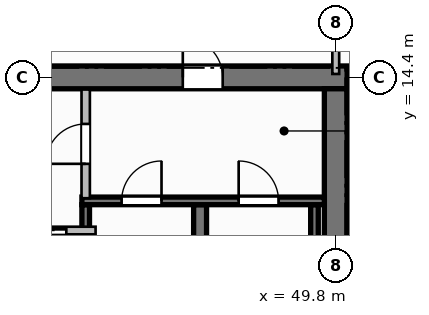
"""IFC4 building model, lengths in metres.
Left out: names, types, materials, properties, quantities, classifications, styles, units other than length and angle.
Written with IfcOpenShell. Run it as: python <this file> out.ifc"""

import sys

from ifc_helpers import new_model, si_unit, direction, frame, frame_2d, origin, place, context, subcontext, project, spatial, rectangle, extrude, source, transform, mapped, element, fill, save


model = new_model("IFC4")
c1 = context("Model", 3, precision=1e-05, world=origin(), true_north=direction((0.0, 1.0)))
c2 = subcontext(c1, "Body", "Model", "MODEL_VIEW")
j1 = project(units=[si_unit("LENGTHUNIT", "METRE"), si_unit("PLANEANGLEUNIT", "RADIAN")], contexts=[c1])
p1 = place(None, origin())
s1 = spatial("IfcSite", under=j1, at=p1, CompositionType="ELEMENT")
p2 = place(p1, origin())
s2 = spatial("IfcBuilding", under=s1, at=p2, CompositionType="ELEMENT")
p3 = place(p2, frame((0.0, 0.0, 21.6)))
s3 = spatial("IfcBuildingStorey", under=s2, at=p3, CompositionType="ELEMENT", Elevation=21.6)
p4 = place(p3, frame((34.5, 14.4, 0.0), z_axis=(0.0, 0.0, 1.0), x_axis=(1.0, 0.0, 0.0)))
e1 = element("IfcWall", 1, at=p4, inside=s3, PredefinedType="SHEAR", context=c2, shape_type="SweptSolid", body=[
    extrude(rectangle(XDim=15.6, YDim=0.6, at=frame_2d((7.8, 0.0))), origin(), (0.0, 0.0, 1.0), 5.4),
])
p5 = place(p4, frame((5.43, 0.0, 0.0)))
e2 = element("IfcOpeningElement", 2, at=p5, cuts=e1, PredefinedType="OPENING", context=c2, shape_type="SweptSolid", body=[
    extrude(rectangle(XDim=1.5, YDim=2.2, at=frame_2d((0.75, 1.1))), frame((0.0, 0.31, 0.0), z_axis=(0.0, -1.0, 0.0), x_axis=(1.0, 0.0, 0.0)), (0.0, 0.0, 1.0), 0.62),
])
p6 = place(p4, frame((1.645, 0.0, 0.0)))
e3 = element("IfcOpeningElement", 3, at=p6, cuts=e1, PredefinedType="OPENING", context=c2, shape_type="SweptSolid", body=[
    extrude(rectangle(XDim=1.05, YDim=2.15, at=frame_2d((0.525, 1.075))), frame((0.0, 0.31, 0.0), z_axis=(0.0, -1.0, 0.0), x_axis=(1.0, 0.0, 0.0)), (0.0, 0.0, 1.0), 0.62),
])
p7 = place(p4, frame((11.275, 0.0, 0.0)))
e4 = element("IfcOpeningElement", 4, at=p7, cuts=e1, PredefinedType="OPENING", context=c2, shape_type="SweptSolid", body=[
    extrude(rectangle(XDim=1.05, YDim=2.15, at=frame_2d((0.525, 1.075))), frame((0.0, 0.31, 0.0), z_axis=(0.0, -1.0, 0.0), x_axis=(1.0, 0.0, 0.0)), (0.0, 0.0, 1.0), 0.62),
])
p8 = place(p3, frame((49.8, 3.9, 0.0), z_axis=(0.0, 0.0, 1.0), x_axis=(0.0, 1.0, 0.0)))
e5 = element("IfcWall", 5, at=p8, inside=s3, PredefinedType="SHEAR", context=c2, shape_type="SweptSolid", body=[
    extrude(rectangle(XDim=10.2, YDim=0.6, at=frame_2d((5.1, 0.0))), origin(), (0.0, 0.0, 1.0), 5.4),
])
p9 = place(p3, frame((43.22, 4.1, 0.0), z_axis=(0.0, 0.0, 1.0), x_axis=(0.0, 1.0, 0.0)))
e6 = element("IfcWall", 6, at=p9, inside=s3, PredefinedType="SHEAR", context=c2, shape_type="SweptSolid", body=[
    extrude(rectangle(XDim=6.95, YDim=0.2, at=frame_2d((3.475, 0.0))), origin(), (0.0, 0.0, 1.0), 5.4),
])
p10 = place(p3, frame((46.23, 4.1, 0.0), z_axis=(0.0, 0.0, 1.0), x_axis=(0.0, 1.0, 0.0)))
e7 = element("IfcWall", 7, at=p10, inside=s3, PredefinedType="SHEAR", context=c2, shape_type="SweptSolid", body=[
    extrude(rectangle(XDim=6.95, YDim=0.34, at=frame_2d((3.475, 0.0))), origin(), (0.0, 0.0, 1.0), 5.4),
])
p11 = place(p3, frame((49.24, 4.1, 0.0), z_axis=(0.0, 0.0, 1.0), x_axis=(0.0, 1.0, 0.0)))
e8 = element("IfcWall", 8, at=p11, inside=s3, PredefinedType="SHEAR", context=c2, shape_type="SweptSolid", body=[
    extrude(rectangle(XDim=6.95, YDim=0.2, at=frame_2d((3.475, 0.0))), origin(), (0.0, 0.0, 1.0), 5.4),
])
p12 = place(p3, frame((43.12, 11.15, 0.0), z_axis=(0.0, 0.0, 1.0), x_axis=(1.0, 0.0, 0.0)))
e9 = element("IfcWall", 9, at=p12, inside=s3, PredefinedType="SHEAR", context=c2, shape_type="SweptSolid", body=[
    extrude(rectangle(XDim=6.38, YDim=0.2, at=frame_2d((3.19, 0.0))), origin(), (0.0, 0.0, 1.0), 5.4),
])
p13 = place(p12, frame((1.045, 0.0, 0.0)))
e10 = element("IfcOpeningElement", 10, at=p13, cuts=e9, PredefinedType="OPENING", context=c2, shape_type="SweptSolid", body=[
    extrude(rectangle(XDim=1.05, YDim=2.2, at=frame_2d((0.525, 1.1))), frame((0.0, 0.11, 0.0), z_axis=(0.0, -1.0, 0.0), x_axis=(1.0, 0.0, 0.0)), (0.0, 0.0, 1.0), 0.22),
])
p14 = place(p12, frame((4.125, 0.0, 0.0)))
e11 = element("IfcOpeningElement", 11, at=p14, cuts=e9, PredefinedType="OPENING", context=c2, shape_type="SweptSolid", body=[
    extrude(rectangle(XDim=1.05, YDim=2.2, at=frame_2d((0.525, 1.1))), frame((0.0, 0.11, 0.0), z_axis=(0.0, -1.0, 0.0), x_axis=(1.0, 0.0, 0.0)), (0.0, 0.0, 1.0), 0.22),
])
p15 = place(p3, frame((43.22, 11.22, 0.0), z_axis=(0.0, 0.0, 1.0), x_axis=(0.0, 1.0, 0.0)))
e12 = element("IfcWall", 12, at=p15, inside=s3, PredefinedType="PARTITIONING", context=c2, shape_type="SweptSolid", body=[
    extrude(rectangle(XDim=2.86, YDim=0.22, at=frame_2d((1.43, 0.0))), origin(), (0.0, 0.0, 1.0), 5.1),
])
p16 = place(p15, frame((0.905, 0.0, 0.0)))
e13 = element("IfcOpeningElement", 13, at=p16, cuts=e12, PredefinedType="OPENING", context=c2, shape_type="SweptSolid", body=[
    extrude(rectangle(XDim=1.05, YDim=2.15, at=frame_2d((0.525, 1.075))), frame((0.0, 0.12, 0.0), z_axis=(0.0, -1.0, 0.0), x_axis=(1.0, 0.0, 0.0)), (0.0, 0.0, 1.0), 0.24),
])
p17 = place(p3, frame((49.8, 14.49, 0.0), z_axis=(0.0, 0.0, 1.0), x_axis=(0.0, 1.0, 0.0)))
e14 = element("IfcWall", 14, at=p17, inside=s3, PredefinedType="PARTITIONING", context=c2, shape_type="SweptSolid", body=[
    extrude(rectangle(XDim=3.42, YDim=0.18, at=frame_2d((1.71, 0.0))), origin(), (0.0, 0.0, 1.0), 4.085),
])
p18 = place(p3, frame((40.84, 10.37, 0.0), z_axis=(0.0, 0.0, 1.0), x_axis=(1.0, 0.0, 0.0)))
e15 = element("IfcWall", 15, at=p18, inside=s3, PredefinedType="PARTITIONING", context=c2, shape_type="SweptSolid", body=[
    extrude(rectangle(XDim=2.64, YDim=0.2, at=frame_2d((1.32, 0.0))), origin(), (0.0, 0.0, 1.0), 5.1),
])
p19 = place(p18, frame((0.77, 0.0, 0.0)))
e16 = element("IfcOpeningElement", 16, at=p19, cuts=e15, PredefinedType="OPENING", context=c2, shape_type="SweptSolid", body=[
    extrude(rectangle(XDim=1.1, YDim=2.2, at=frame_2d((0.55, 1.1))), frame((0.0, 0.11, 0.0), z_axis=(0.0, -1.0, 0.0), x_axis=(1.0, 0.0, 0.0)), (0.0, 0.0, 1.0), 0.22),
])
m1 = source(origin(), c2, "Body", "SweptSolid", [
    extrude(rectangle(XDim=1.05, YDim=2.2, at=frame_2d((0.525, 1.1))), frame((0.0, 0.025, 0.0), z_axis=(0.0, -1.0, 0.0), x_axis=(1.0, 0.0, 0.0)), (0.0, 0.0, 1.0), 0.05),
])
p20 = place(p13, origin())
e17 = element("IfcDoor", 17, at=p20, inside=s3, OperationType="SINGLE_SWING_RIGHT", PredefinedType="DOOR", context=c2, shape_type="MappedRepresentation", body=[
    mapped(m1, transform((0.0, 0.0, 0.0), scale=1.0)),
])
fill(e10, e17)
p21 = place(p14, origin())
e18 = element("IfcDoor", 18, at=p21, inside=s3, OperationType="SINGLE_SWING_LEFT", PredefinedType="DOOR", context=c2, shape_type="MappedRepresentation", body=[
    mapped(m1, transform((0.0, 0.0, 0.0), scale=1.0)),
])
fill(e11, e18)
m2 = source(origin(), c2, "Body", "SweptSolid", [
    extrude(rectangle(XDim=1.05, YDim=2.15, at=frame_2d((0.525, 1.075))), frame((0.0, 0.025, 0.0), z_axis=(0.0, -1.0, 0.0), x_axis=(1.0, 0.0, 0.0)), (0.0, 0.0, 1.0), 0.05),
])
p22 = place(p16, origin())
e19 = element("IfcDoor", 19, at=p22, inside=s3, OperationType="SINGLE_SWING_LEFT", PredefinedType="DOOR", context=c2, shape_type="MappedRepresentation", body=[
    mapped(m2, transform((0.0, 0.0, 0.0), scale=1.0)),
])
fill(e13, e19)
p23 = place(p7, origin())
e20 = element("IfcDoor", 20, at=p23, inside=s3, OperationType="SINGLE_SWING_LEFT", PredefinedType="DOOR", context=c2, shape_type="MappedRepresentation", body=[
    mapped(m2, transform((0.0, 0.0, 0.0), scale=1.0)),
])
fill(e4, e20)
m3 = source(origin(), c2, "Body", "SweptSolid", [
    extrude(rectangle(XDim=1.1, YDim=2.2, at=frame_2d((0.55, 1.1))), frame((0.0, 0.025, 0.0), z_axis=(0.0, -1.0, 0.0), x_axis=(1.0, 0.0, 0.0)), (0.0, 0.0, 1.0), 0.05),
])
p24 = place(p19, origin())
e21 = element("IfcDoor", 21, at=p24, inside=s3, OperationType="SLIDING_TO_LEFT", PredefinedType="DOOR", context=c2, shape_type="MappedRepresentation", body=[
    mapped(m3, transform((0.0, 0.0, 0.0), scale=1.0)),
])
fill(e16, e21)
save(model, sys.argv[1])
